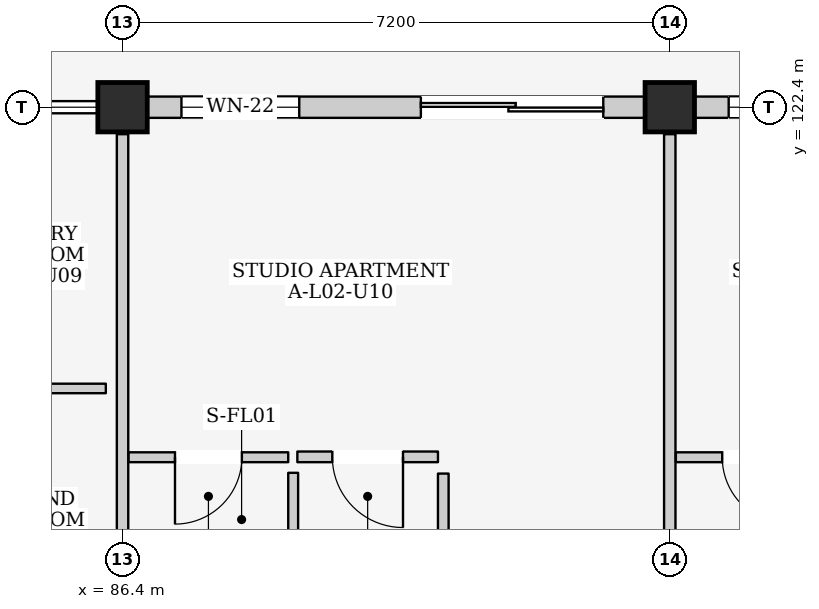
"""IFC4 building model, lengths in metres.
Left out: names, types, materials, properties, quantities, classifications, styles, units other than length and angle.
Written with IfcOpenShell. Run it as: python <this file> out.ifc"""

import sys

from ifc_helpers import new_model, si_unit, direction, frame, frame_2d, origin, origin_2d, place, context, subcontext, project, spatial, rectangle, extrude, element, fill, save


model = new_model("IFC4")
c1 = context("Model", 3, precision=1e-05, world=origin(), true_north=direction((0.0, 1.0)))
c2 = subcontext(c1, "Body", "Model", "MODEL_VIEW")
j1 = project(units=[si_unit("LENGTHUNIT", "METRE"), si_unit("PLANEANGLEUNIT", "RADIAN")], contexts=[c1])
p1 = place(None, origin())
s1 = spatial("IfcSite", under=j1, at=p1, CompositionType="ELEMENT")
p2 = place(p1, origin())
s2 = spatial("IfcBuilding", under=s1, at=p2, CompositionType="ELEMENT")
p3 = place(p2, frame((0.0, 0.0, 9.0)))
s3 = spatial("IfcBuildingStorey", under=s2, at=p3, CompositionType="ELEMENT", Elevation=9.0)
for number, where, z_axis, x_axis in (
    (1, (86.4, 122.4, 0.0), (0.0, 0.0, 1.0), (1.0, 0.0, 0.0)),
    (2, (93.6, 122.4, 0.0), (0.0, 0.0, 1.0), (1.0, 0.0, 0.0)),
):
    element("IfcColumn", number, at=place(p3, frame(where, z_axis=z_axis, x_axis=x_axis)), inside=s3, PredefinedType="COLUMN", context=c2, shape_type="SweptSolid", body=[
        extrude(rectangle(XDim=0.65, YDim=0.65, at=origin_2d()), origin(), (0.0, 0.0, 1.0), 3.2),
    ])
p4 = place(p3, frame((86.725, 122.4, 0.0), z_axis=(0.0, 0.0, 1.0), x_axis=(1.0, 0.0, 0.0)))
e3 = element("IfcWall", 3, at=p4, inside=s3, PredefinedType="ELEMENTEDWALL", context=c2, shape_type="SweptSolid", body=[
    extrude(rectangle(XDim=6.55, YDim=0.28, at=frame_2d((3.275, 0.0))), origin(), (0.0, 0.0, 1.0), 2.425),
])
p5 = place(p4, frame((3.6, 0.0, 0.0)))
e4 = element("IfcOpeningElement", 4, at=p5, cuts=e3, PredefinedType="OPENING", context=c2, shape_type="SweptSolid", body=[
    extrude(rectangle(XDim=2.4, YDim=2.12, at=frame_2d((1.2, 1.06))), frame((0.0, 0.155, 0.0), z_axis=(0.0, -1.0, 0.0), x_axis=(1.0, 0.0, 0.0)), (0.0, 0.0, 1.0), 0.31),
])
p6 = place(p4, frame((0.45, 0.0, 0.865)))
e5 = element("IfcOpeningElement", 5, at=p6, cuts=e3, PredefinedType="OPENING", context=c2, shape_type="SweptSolid", body=[
    extrude(rectangle(XDim=1.55, YDim=1.45, at=frame_2d((0.775, 0.725))), frame((0.0, 0.155, 0.0), z_axis=(0.0, -1.0, 0.0), x_axis=(1.0, 0.0, 0.0)), (0.0, 0.0, 1.0), 0.31),
])
p7 = place(p3, frame((93.925, 122.4, 0.0), z_axis=(0.0, 0.0, 1.0), x_axis=(1.0, 0.0, 0.0)))
e6 = element("IfcWall", 6, at=p7, inside=s3, PredefinedType="ELEMENTEDWALL", context=c2, shape_type="SweptSolid", body=[
    extrude(rectangle(XDim=6.55, YDim=0.28, at=frame_2d((3.275, 0.0))), origin(), (0.0, 0.0, 1.0), 2.425),
])
p8 = place(p7, frame((4.0, 0.0, 0.0)))
e7 = element("IfcOpeningElement", 7, at=p8, cuts=e6, PredefinedType="OPENING", context=c2, shape_type="SweptSolid", body=[
    extrude(rectangle(XDim=2.0, YDim=2.12, at=frame_2d((1.0, 1.06))), frame((0.0, 0.155, 0.0), z_axis=(0.0, -1.0, 0.0), x_axis=(1.0, 0.0, 0.0)), (0.0, 0.0, 1.0), 0.31),
])
p9 = place(p7, frame((0.45, 0.0, 0.9)))
e8 = element("IfcOpeningElement", 8, at=p9, cuts=e6, PredefinedType="OPENING", context=c2, shape_type="SweptSolid", body=[
    extrude(rectangle(XDim=1.85, YDim=1.4, at=frame_2d((0.925, 0.7))), frame((0.0, 0.155, 0.0), z_axis=(0.0, -1.0, 0.0), x_axis=(1.0, 0.0, 0.0)), (0.0, 0.0, 1.0), 0.31),
])
p10 = place(p3, frame((86.4, 115.555, 0.0), z_axis=(0.0, 0.0, 1.0), x_axis=(0.0, 1.0, 0.0)))
e9 = element("IfcWall", 9, at=p10, inside=s3, PredefinedType="PARTITIONING", context=c2, shape_type="SweptSolid", body=[
    extrude(rectangle(XDim=6.49, YDim=0.15, at=frame_2d((3.245, 0.0))), origin(), (0.0, 0.0, 1.0), 2.395),
])
p11 = place(p3, frame((83.12, 118.7, 0.0), z_axis=(0.0, 0.0, 1.0), x_axis=(1.0, 0.0, 0.0)))
e10 = element("IfcWall", 10, at=p11, inside=s3, PredefinedType="PARTITIONING", context=c2, shape_type="SweptSolid", body=[
    extrude(rectangle(XDim=3.06, YDim=0.125, at=frame_2d((1.53, 0.0))), origin(), (0.0, 0.0, 1.0), 2.96),
])
p12 = place(p3, frame((93.6, 115.555, 0.0), z_axis=(0.0, 0.0, 1.0), x_axis=(0.0, 1.0, 0.0)))
e11 = element("IfcWall", 11, at=p12, inside=s3, PredefinedType="PARTITIONING", context=c2, shape_type="SweptSolid", body=[
    extrude(rectangle(XDim=6.49, YDim=0.15, at=frame_2d((3.245, 0.0))), origin(), (0.0, 0.0, 1.0), 2.395),
])
p13 = place(p3, frame((86.48, 117.795, 0.0), z_axis=(0.0, 0.0, 1.0), x_axis=(1.0, 0.0, 0.0)))
e12 = element("IfcWall", 12, at=p13, inside=s3, PredefinedType="PARTITIONING", context=c2, shape_type="SweptSolid", body=[
    extrude(rectangle(XDim=2.1, YDim=0.13, at=frame_2d((1.05, 0.0))), origin(), (0.0, 0.0, 1.0), 2.96),
])
p14 = place(p13, frame((0.61, 0.0, 0.0)))
e13 = element("IfcOpeningElement", 13, at=p14, cuts=e12, PredefinedType="OPENING", context=c2, shape_type="SweptSolid", body=[
    extrude(rectangle(XDim=0.88, YDim=2.1, at=frame_2d((0.44, 1.05))), frame((0.0, 0.08, 0.0), z_axis=(0.0, -1.0, 0.0), x_axis=(1.0, 0.0, 0.0)), (0.0, 0.0, 1.0), 0.16),
])
p15 = place(p3, frame((88.645, 115.46, 0.0), z_axis=(0.0, 0.0, 1.0), x_axis=(0.0, 1.0, 0.0)))
e14 = element("IfcWall", 14, at=p15, inside=s3, PredefinedType="PARTITIONING", context=c2, shape_type="SweptSolid", body=[
    extrude(rectangle(XDim=2.13, YDim=0.13, at=frame_2d((1.065, 0.0))), origin(), (0.0, 0.0, 1.0), 2.96),
])
p16 = place(p3, frame((88.7, 117.8, 0.0), z_axis=(0.0, 0.0, 1.0), x_axis=(1.0, 0.0, 0.0)))
e15 = element("IfcWall", 15, at=p16, inside=s3, PredefinedType="PARTITIONING", context=c2, shape_type="SweptSolid", body=[
    extrude(rectangle(XDim=1.85, YDim=0.14, at=frame_2d((0.925, 0.0))), origin(), (0.0, 0.0, 1.0), 2.96),
])
p17 = place(p16, frame((0.46, 0.0, 0.0)))
e16 = element("IfcOpeningElement", 16, at=p17, cuts=e15, PredefinedType="OPENING", context=c2, shape_type="SweptSolid", body=[
    extrude(rectangle(XDim=0.93, YDim=2.14, at=frame_2d((0.465, 1.07))), frame((0.0, 0.085, 0.0), z_axis=(0.0, -1.0, 0.0), x_axis=(1.0, 0.0, 0.0)), (0.0, 0.0, 1.0), 0.17),
])
p18 = place(p3, frame((90.62, 115.43, 0.0), z_axis=(0.0, 0.0, 1.0), x_axis=(0.0, 1.0, 0.0)))
e17 = element("IfcWall", 17, at=p18, inside=s3, PredefinedType="PARTITIONING", context=c2, shape_type="SweptSolid", body=[
    extrude(rectangle(XDim=2.15, YDim=0.14, at=frame_2d((1.075, 0.0))), origin(), (0.0, 0.0, 1.0), 2.96),
])
p19 = place(p3, frame((93.68, 117.795, 0.0), z_axis=(0.0, 0.0, 1.0), x_axis=(1.0, 0.0, 0.0)))
e18 = element("IfcWall", 18, at=p19, inside=s3, PredefinedType="PARTITIONING", context=c2, shape_type="SweptSolid", body=[
    extrude(rectangle(XDim=2.1, YDim=0.13, at=frame_2d((1.05, 0.0))), origin(), (0.0, 0.0, 1.0), 2.96),
])
p20 = place(p19, frame((0.61, 0.0, 0.0)))
e19 = element("IfcOpeningElement", 19, at=p20, cuts=e18, PredefinedType="OPENING", context=c2, shape_type="SweptSolid", body=[
    extrude(rectangle(XDim=0.88, YDim=2.1, at=frame_2d((0.44, 1.05))), frame((0.0, 0.08, 0.0), z_axis=(0.0, -1.0, 0.0), x_axis=(1.0, 0.0, 0.0)), (0.0, 0.0, 1.0), 0.16),
])
p21 = place(p5, frame((2.4, 0.0, 0.0), z_axis=(0.0, 0.0, 1.0), x_axis=(-1.0, 0.0, 0.0)))
e20 = element("IfcDoor", 20, at=p21, inside=s3, OperationType="DOUBLE_DOOR_SLIDING", PredefinedType="DOOR", context=c2, shape_type="SweptSolid", body=[
    extrude(rectangle(XDim=2.4, YDim=2.12, at=frame_2d((1.2, 1.06))), frame((0.0, 0.025, 0.0), z_axis=(0.0, -1.0, 0.0), x_axis=(1.0, 0.0, 0.0)), (0.0, 0.0, 1.0), 0.05),
])
fill(e4, e20)
p22 = place(p6, origin())
e21 = element("IfcWindow", 21, at=p22, inside=s3, PartitioningType="DOUBLE_PANEL_VERTICAL", PredefinedType="WINDOW", context=c2, shape_type="SweptSolid", body=[
    extrude(rectangle(XDim=1.55, YDim=1.45, at=frame_2d((0.775, 0.725))), frame((0.0, 0.03, 0.0), z_axis=(0.0, -1.0, 0.0), x_axis=(1.0, 0.0, 0.0)), (0.0, 0.0, 1.0), 0.06),
])
fill(e5, e21)
p23 = place(p9, origin())
e22 = element("IfcWindow", 22, at=p23, inside=s3, PartitioningType="DOUBLE_PANEL_VERTICAL", PredefinedType="WINDOW", context=c2, shape_type="SweptSolid", body=[
    extrude(rectangle(XDim=1.85, YDim=1.4, at=frame_2d((0.925, 0.7))), frame((0.0, 0.03, 0.0), z_axis=(0.0, -1.0, 0.0), x_axis=(1.0, 0.0, 0.0)), (0.0, 0.0, 1.0), 0.06),
])
fill(e8, e22)
p24 = place(p14, frame((0.88, 0.0, 0.0), z_axis=(0.0, 0.0, 1.0), x_axis=(-1.0, 0.0, 0.0)))
e23 = element("IfcDoor", 23, at=p24, inside=s3, OperationType="SINGLE_SWING_RIGHT", PredefinedType="DOOR", context=c2, shape_type="SweptSolid", body=[
    extrude(rectangle(XDim=0.88, YDim=2.1, at=frame_2d((0.44, 1.05))), frame((0.0, 0.025, 0.0), z_axis=(0.0, -1.0, 0.0), x_axis=(1.0, 0.0, 0.0)), (0.0, 0.0, 1.0), 0.05),
])
fill(e13, e23)
p25 = place(p17, frame((0.93, 0.0, 0.0), z_axis=(0.0, 0.0, 1.0), x_axis=(-1.0, 0.0, 0.0)))
e24 = element("IfcDoor", 24, at=p25, inside=s3, OperationType="SINGLE_SWING_LEFT", PredefinedType="DOOR", context=c2, shape_type="SweptSolid", body=[
    extrude(rectangle(XDim=0.93, YDim=2.14, at=frame_2d((0.465, 1.07))), frame((0.0, 0.025, 0.0), z_axis=(0.0, -1.0, 0.0), x_axis=(1.0, 0.0, 0.0)), (0.0, 0.0, 1.0), 0.05),
])
fill(e16, e24)
p26 = place(p20, frame((0.88, 0.0, 0.0), z_axis=(0.0, 0.0, 1.0), x_axis=(-1.0, 0.0, 0.0)))
e25 = element("IfcDoor", 25, at=p26, inside=s3, OperationType="SINGLE_SWING_LEFT", PredefinedType="DOOR", context=c2, shape_type="SweptSolid", body=[
    extrude(rectangle(XDim=0.88, YDim=2.1, at=frame_2d((0.44, 1.05))), frame((0.0, 0.025, 0.0), z_axis=(0.0, -1.0, 0.0), x_axis=(1.0, 0.0, 0.0)), (0.0, 0.0, 1.0), 0.05),
])
fill(e19, e25)
save(model, sys.argv[1])
